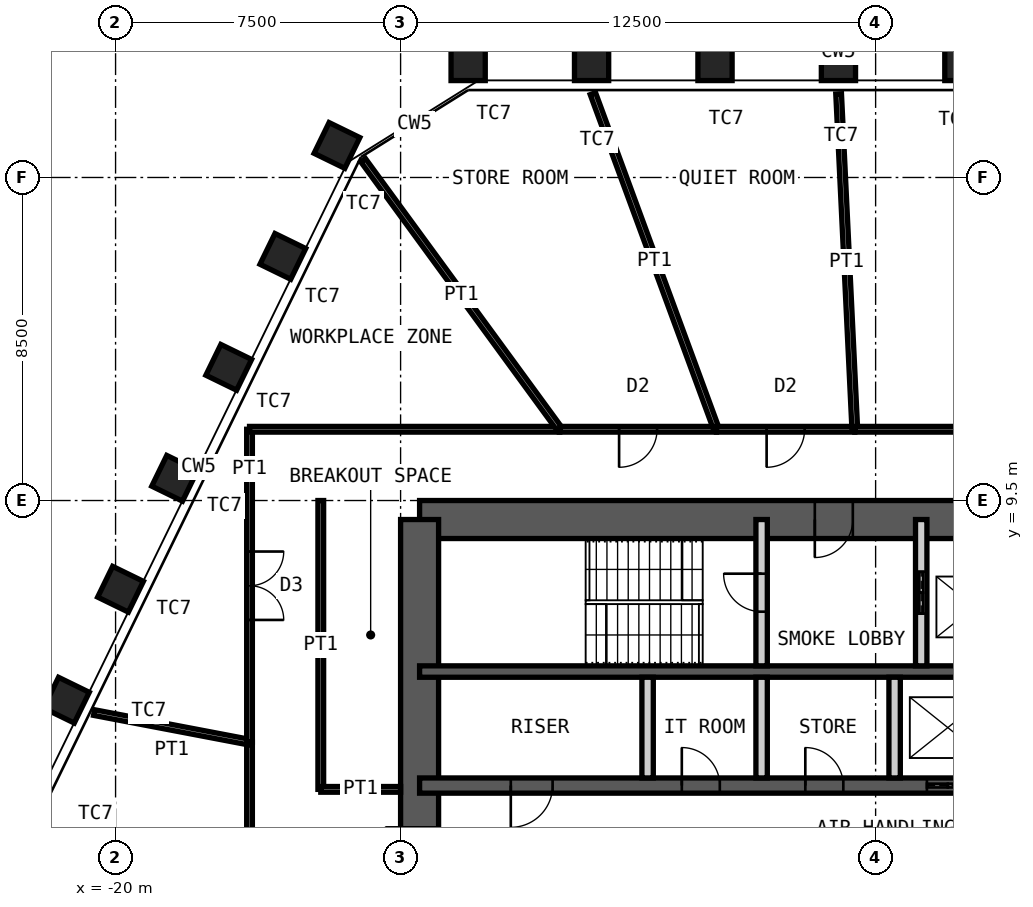
"""IFC4 building model, lengths in metres.
Left out: names, types, materials, properties, quantities, classifications, styles, units other than length and angle.
Written with IfcOpenShell. Run it as: python <this file> out.ifc"""

import sys

from ifc_helpers import new_model, si_unit, direction, frame, frame_2d, origin, origin_2d, place, context, subcontext, project, spatial, rectangle, hollow_rectangle, extrude, element, fill, save


model = new_model("IFC4")
c1 = context("Model", 3, precision=1e-05, world=origin(), true_north=direction((0.0, 1.0)))
c2 = subcontext(c1, "Body", "Model", "MODEL_VIEW")
j1 = project(units=[si_unit("LENGTHUNIT", "METRE"), si_unit("PLANEANGLEUNIT", "RADIAN")], contexts=[c1])
p1 = place(None, origin())
s1 = spatial("IfcSite", under=j1, at=p1, CompositionType="ELEMENT")
p2 = place(p1, origin())
s2 = spatial("IfcBuilding", under=s1, at=p2, CompositionType="ELEMENT")
p3 = place(p2, frame((0.0, 0.0, 266.2)))
s3 = spatial("IfcBuildingStorey", under=s2, at=p3, CompositionType="ELEMENT", Elevation=266.2)
for number, where, z_axis, x_axis in (
    (1, (-10.722, 21.0, 0.0), (0.0, 0.0, 1.0), (-1.0, 0.0, 0.0)),
    (2, (-7.474, 21.0, 0.0), (0.0, 0.0, 1.0), (-1.0, 0.0, 0.0)),
    (3, (-4.226, 21.0, 0.0), (0.0, 0.0, 1.0), (-1.0, 0.0, 0.0)),
    (4, (-0.978, 21.0, 0.0), (0.0, 0.0, 1.0), (-1.0, 0.0, 0.0)),
    (5, (2.27, 21.0, 0.0), (0.0, 0.0, 1.0), (-1.0, 0.0, 0.0)),
    (6, (-21.293, 4.246, 0.0), (0.0, 0.0, 1.0), (-0.438, -0.899, 0.0)),
    (7, (-19.87, 7.166, 0.0), (0.0, 0.0, 1.0), (-0.438, -0.899, 0.0)),
    (8, (-18.446, 10.085, 0.0), (0.0, 0.0, 1.0), (-0.438, -0.899, 0.0)),
    (9, (-17.022, 13.004, 0.0), (0.0, 0.0, 1.0), (-0.438, -0.899, 0.0)),
    (10, (-15.598, 15.924, 0.0), (0.0, 0.0, 1.0), (-0.438, -0.899, 0.0)),
    (11, (-14.174, 18.843, 0.0), (0.0, 0.0, 1.0), (-0.438, -0.899, 0.0)),
):
    element("IfcColumn", number, at=place(p3, frame(where, z_axis=z_axis, x_axis=x_axis)), inside=s3, PredefinedType="COLUMN", context=c2, shape_type="SweptSolid", body=[
        extrude(hollow_rectangle(XDim=0.9, YDim=0.9, WallThickness=0.06, at=origin_2d()), origin(), (0.0, 0.0, 1.0), 4.2),
    ])
p4 = place(p3, frame((-12.0, 9.0, 0.0), z_axis=(0.0, 0.0, 1.0), x_axis=(1.0, 0.0, 0.0)))
e12 = element("IfcWall", 12, at=p4, inside=s3, PredefinedType="SHEAR", context=c2, shape_type="SweptSolid", body=[
    extrude(rectangle(XDim=24.0, YDim=1.0, at=frame_2d((12.0, 0.0))), origin(), (0.0, 0.0, 1.0), 4.2),
])
p5 = place(p4, frame((10.4, 0.0, 0.0)))
e13 = element("IfcOpeningElement", 13, at=p5, cuts=e12, PredefinedType="OPENING", context=c2, shape_type="SweptSolid", body=[
    extrude(rectangle(XDim=1.0, YDim=2.1, at=frame_2d((0.5, 1.05))), frame((0.0, 0.51, 0.0), z_axis=(0.0, -1.0, 0.0), x_axis=(1.0, 0.0, 0.0)), (0.0, 0.0, 1.0), 1.02),
])
p6 = place(p4, frame((17.6, 0.0, 0.0)))
e14 = element("IfcOpeningElement", 14, at=p6, cuts=e12, PredefinedType="OPENING", context=c2, shape_type="SweptSolid", body=[
    extrude(rectangle(XDim=0.9, YDim=2.1, at=frame_2d((0.45, 1.05))), frame((0.0, 0.51, 0.0), z_axis=(0.0, -1.0, 0.0), x_axis=(1.0, 0.0, 0.0)), (0.0, 0.0, 1.0), 1.02),
])
p7 = place(p4, frame((21.9, 0.0, 0.0)))
e15 = element("IfcOpeningElement", 15, at=p7, cuts=e12, PredefinedType="OPENING", context=c2, shape_type="SweptSolid", body=[
    extrude(rectangle(XDim=0.9, YDim=2.1, at=frame_2d((0.45, 1.05))), frame((0.0, 0.51, 0.0), z_axis=(0.0, -1.0, 0.0), x_axis=(1.0, 0.0, 0.0)), (0.0, 0.0, 1.0), 1.02),
])
p8 = place(p3, frame((-12.0, -9.0, 0.0), z_axis=(0.0, 0.0, 1.0), x_axis=(0.0, 1.0, 0.0)))
e16 = element("IfcWall", 16, at=p8, inside=s3, PredefinedType="SHEAR", context=c2, shape_type="SweptSolid", body=[
    extrude(rectangle(XDim=18.0, YDim=1.0, at=frame_2d((9.0, 0.0))), origin(), (0.0, 0.0, 1.0), 4.2),
])
p9 = place(p8, frame((8.1, 0.0, 0.0)))
e17 = element("IfcOpeningElement", 17, at=p9, cuts=e16, PredefinedType="OPENING", context=c2, shape_type="SweptSolid", body=[
    extrude(rectangle(XDim=1.8, YDim=2.1, at=frame_2d((0.9, 1.05))), frame((0.0, 0.51, 0.0), z_axis=(0.0, -1.0, 0.0), x_axis=(1.0, 0.0, 0.0)), (0.0, 0.0, 1.0), 1.02),
])
p10 = place(p3, frame((-12.0, 5.0, 0.0), z_axis=(0.0, 0.0, 1.0), x_axis=(1.0, 0.0, 0.0)))
e18 = element("IfcWall", 18, at=p10, inside=s3, PredefinedType="SHEAR", context=c2, shape_type="SweptSolid", body=[
    extrude(rectangle(XDim=24.0, YDim=0.3, at=frame_2d((12.0, 0.0))), origin(), (0.0, 0.0, 1.0), 4.2),
])
p11 = place(p3, frame((-12.0, 2.0, 0.0), z_axis=(0.0, 0.0, 1.0), x_axis=(1.0, 0.0, 0.0)))
e19 = element("IfcWall", 19, at=p11, inside=s3, PredefinedType="SHEAR", context=c2, shape_type="SweptSolid", body=[
    extrude(rectangle(XDim=24.0, YDim=0.4, at=frame_2d((12.0, 0.0))), origin(), (0.0, 0.0, 1.0), 4.2),
])
p12 = place(p11, frame((2.4, 0.0, 0.0)))
e20 = element("IfcOpeningElement", 20, at=p12, cuts=e19, PredefinedType="OPENING", context=c2, shape_type="SweptSolid", body=[
    extrude(rectangle(XDim=1.1, YDim=2.1, at=frame_2d((0.55, 1.05))), frame((0.0, 0.21, 0.0), z_axis=(0.0, -1.0, 0.0), x_axis=(1.0, 0.0, 0.0)), (0.0, 0.0, 1.0), 0.42),
])
p13 = place(p11, frame((22.0, 0.0, 0.0)))
e21 = element("IfcOpeningElement", 21, at=p13, cuts=e19, PredefinedType="OPENING", context=c2, shape_type="SweptSolid", body=[
    extrude(rectangle(XDim=1.1, YDim=2.1, at=frame_2d((0.55, 1.05))), frame((0.0, 0.21, 0.0), z_axis=(0.0, -1.0, 0.0), x_axis=(1.0, 0.0, 0.0)), (0.0, 0.0, 1.0), 0.42),
])
p14 = place(p11, frame((10.15, 0.0, 0.0)))
e22 = element("IfcOpeningElement", 22, at=p14, cuts=e19, PredefinedType="OPENING", context=c2, shape_type="SweptSolid", body=[
    extrude(rectangle(XDim=1.0, YDim=2.1, at=frame_2d((0.5, 1.05))), frame((0.0, 0.21, 0.0), z_axis=(0.0, -1.0, 0.0), x_axis=(1.0, 0.0, 0.0)), (0.0, 0.0, 1.0), 0.42),
])
p15 = place(p11, frame((6.9, 0.0, 0.0)))
e23 = element("IfcOpeningElement", 23, at=p15, cuts=e19, PredefinedType="OPENING", context=c2, shape_type="SweptSolid", body=[
    extrude(rectangle(XDim=1.0, YDim=2.1, at=frame_2d((0.5, 1.05))), frame((0.0, 0.21, 0.0), z_axis=(0.0, -1.0, 0.0), x_axis=(1.0, 0.0, 0.0)), (0.0, 0.0, 1.0), 0.42),
])
p16 = place(p11, frame((13.35, 0.0, 0.0)))
e24 = element("IfcOpeningElement", 24, at=p16, cuts=e19, PredefinedType="OPENING", context=c2, shape_type="SweptSolid", body=[
    extrude(rectangle(XDim=1.1, YDim=2.4, at=frame_2d((0.55, 1.2))), frame((0.0, 0.21, 0.0), z_axis=(0.0, -1.0, 0.0), x_axis=(1.0, 0.0, 0.0)), (0.0, 0.0, 1.0), 0.42),
])
p17 = place(p11, frame((16.15, 0.0, 0.0)))
e25 = element("IfcOpeningElement", 25, at=p17, cuts=e19, PredefinedType="OPENING", context=c2, shape_type="SweptSolid", body=[
    extrude(rectangle(XDim=1.1, YDim=2.4, at=frame_2d((0.55, 1.2))), frame((0.0, 0.21, 0.0), z_axis=(0.0, -1.0, 0.0), x_axis=(1.0, 0.0, 0.0)), (0.0, 0.0, 1.0), 0.42),
])
p18 = place(p11, frame((19.0, 0.0, 0.0)))
e26 = element("IfcOpeningElement", 26, at=p18, cuts=e19, PredefinedType="OPENING", context=c2, shape_type="SweptSolid", body=[
    extrude(rectangle(XDim=1.0, YDim=2.1, at=frame_2d((0.5, 1.05))), frame((0.0, 0.21, 0.0), z_axis=(0.0, -1.0, 0.0), x_axis=(1.0, 0.0, 0.0)), (0.0, 0.0, 1.0), 0.42),
])
p19 = place(p3, frame((-3.0, 5.15, 0.0), z_axis=(0.0, 0.0, 1.0), x_axis=(0.0, 1.0, 0.0)))
e27 = element("IfcWall", 27, at=p19, inside=s3, PredefinedType="PARTITIONING", context=c2, shape_type="SweptSolid", body=[
    extrude(rectangle(XDim=3.85, YDim=0.3, at=frame_2d((1.925, 0.0))), origin(), (0.0, 0.0, 1.0), 3.98),
])
p20 = place(p19, frame((1.425, 0.0, 0.0)))
e28 = element("IfcOpeningElement", 28, at=p20, cuts=e27, PredefinedType="OPENING", context=c2, shape_type="SweptSolid", body=[
    extrude(rectangle(XDim=1.0, YDim=2.1, at=frame_2d((0.5, 1.05))), frame((0.0, 0.16, 0.0), z_axis=(0.0, -1.0, 0.0), x_axis=(1.0, 0.0, 0.0)), (0.0, 0.0, 1.0), 0.32),
])
p21 = place(p3, frame((1.2, 5.15, 0.0), z_axis=(0.0, 0.0, 1.0), x_axis=(0.0, 1.0, 0.0)))
e29 = element("IfcWall", 29, at=p21, inside=s3, PredefinedType="PARTITIONING", context=c2, shape_type="SweptSolid", body=[
    extrude(rectangle(XDim=3.85, YDim=0.3, at=frame_2d((1.925, 0.0))), origin(), (0.0, 0.0, 1.0), 3.98),
])
p22 = place(p21, frame((1.375, 0.0, 0.0)))
e30 = element("IfcOpeningElement", 30, at=p22, cuts=e29, PredefinedType="OPENING", context=c2, shape_type="SweptSolid", body=[
    extrude(rectangle(XDim=1.1, YDim=2.4, at=frame_2d((0.55, 1.2))), frame((0.0, 0.16, 0.0), z_axis=(0.0, -1.0, 0.0), x_axis=(1.0, 0.0, 0.0)), (0.0, 0.0, 1.0), 0.32),
])
for number, where, z_axis, x_axis in (
    (31, (-6.0, 2.2, 0.0), (0.0, 0.0, 1.0), (0.0, 1.0, 0.0)),
    (32, (-3.0, 2.2, 0.0), (0.0, 0.0, 1.0), (0.0, 1.0, 0.0)),
    (33, (0.5, 2.2, 0.0), (0.0, 0.0, 1.0), (0.0, 1.0, 0.0)),
):
    element("IfcWall", number, at=place(p3, frame(where, z_axis=z_axis, x_axis=x_axis)), inside=s3, PredefinedType="PARTITIONING", context=c2, shape_type="SweptSolid", body=[
        extrude(rectangle(XDim=2.65, YDim=0.3, at=frame_2d((1.325, 0.0))), origin(), (0.0, 0.0, 1.0), 3.98),
    ])
p23 = place(p3, frame((-16.475, -4.351, 0.0), z_axis=(0.0, 0.0, 1.0), x_axis=(0.0, 1.0, 0.0)))
e34 = element("IfcWall", 34, at=p23, inside=s3, PredefinedType="PARTITIONING", context=c2, shape_type="SweptSolid", body=[
    extrude(rectangle(XDim=7.492, YDim=0.15, at=frame_2d((3.746, 0.0))), origin(), (0.0, 0.0, 1.0), 4.03),
])
p24 = place(p23, frame((3.246, 0.0, 0.0)))
e35 = element("IfcOpeningElement", 35, at=p24, cuts=e34, PredefinedType="OPENING", context=c2, shape_type="SweptSolid", body=[
    extrude(rectangle(XDim=1.0, YDim=2.4, at=frame_2d((0.5, 1.2))), frame((0.0, 0.085, 0.0), z_axis=(0.0, -1.0, 0.0), x_axis=(1.0, 0.0, 0.0)), (0.0, 0.0, 1.0), 0.17),
])
p25 = place(p3, frame((-20.566, 3.921, 0.0), z_axis=(0.0, 0.0, 1.0), x_axis=(0.982304172816, -0.187292584123, 0.0)))
e36 = element("IfcWall", 36, at=p25, inside=s3, PredefinedType="PARTITIONING", context=c2, shape_type="SweptSolid", body=[
    extrude(rectangle(XDim=4.165, YDim=0.15, at=frame_2d((2.083, 0.0))), origin(), (0.0, 0.0, 1.0), 3.33),
])
p26 = place(p3, frame((-16.475, 3.141, 0.0), z_axis=(0.0, 0.0, 1.0), x_axis=(0.0, 1.0, 0.0)))
e37 = element("IfcWall", 37, at=p26, inside=s3, PredefinedType="PARTITIONING", context=c2, shape_type="SweptSolid", body=[
    extrude(rectangle(XDim=8.234, YDim=0.15, at=frame_2d((4.117, 0.0))), origin(), (0.0, 0.0, 1.0), 4.03),
])
p27 = place(p26, frame((3.217, 0.0, 0.0)))
e38 = element("IfcOpeningElement", 38, at=p27, cuts=e37, PredefinedType="OPENING", context=c2, shape_type="SweptSolid", body=[
    extrude(rectangle(XDim=1.8, YDim=2.4, at=frame_2d((0.9, 1.2))), frame((0.0, 0.085, 0.0), z_axis=(0.0, -1.0, 0.0), x_axis=(1.0, 0.0, 0.0)), (0.0, 0.0, 1.0), 0.17),
])
p28 = place(p3, frame((-16.475, 11.375, 0.0), z_axis=(0.0, 0.0, 1.0), x_axis=(1.0, 0.0, 0.0)))
e39 = element("IfcWall", 39, at=p28, inside=s3, PredefinedType="PARTITIONING", context=c2, shape_type="SweptSolid", body=[
    extrude(rectangle(XDim=8.163, YDim=0.15, at=frame_2d((4.082, 0.0))), origin(), (0.0, 0.0, 1.0), 4.03),
])
p29 = place(p3, frame((-13.486, 18.455, 0.0), z_axis=(0.0, 0.0, 1.0), x_axis=(0.589997742419, -0.807404894672, 0.0)))
e40 = element("IfcWall", 40, at=p29, inside=s3, PredefinedType="PARTITIONING", context=c2, shape_type="SweptSolid", body=[
    extrude(rectangle(XDim=8.769, YDim=0.15, at=frame_2d((4.385, 0.0))), origin(), (0.0, 0.0, 1.0), 2.93),
])
p30 = place(p3, frame((-8.312, 11.375, 0.0), z_axis=(0.0, 0.0, 1.0), x_axis=(1.0, 0.0, 0.0)))
e41 = element("IfcWall", 41, at=p30, inside=s3, PredefinedType="PARTITIONING", context=c2, shape_type="SweptSolid", body=[
    extrude(rectangle(XDim=4.124, YDim=0.15, at=frame_2d((2.062, 0.0))), origin(), (0.0, 0.0, 1.0), 4.03),
])
p31 = place(p30, frame((1.562, 0.0, 0.0)))
e42 = element("IfcOpeningElement", 42, at=p31, cuts=e41, PredefinedType="OPENING", context=c2, shape_type="SweptSolid", body=[
    extrude(rectangle(XDim=1.0, YDim=2.4, at=frame_2d((0.5, 1.2))), frame((0.0, 0.085, 0.0), z_axis=(0.0, -1.0, 0.0), x_axis=(1.0, 0.0, 0.0)), (0.0, 0.0, 1.0), 0.17),
])
p32 = place(p3, frame((-7.44, 20.206, 0.0), z_axis=(0.0, 0.0, 1.0), x_axis=(0.345510588088, -0.938414851502, 0.0)))
e43 = element("IfcWall", 43, at=p32, inside=s3, PredefinedType="PARTITIONING", context=c2, shape_type="SweptSolid", body=[
    extrude(rectangle(XDim=9.411, YDim=0.15, at=frame_2d((4.705, 0.0))), origin(), (0.0, 0.0, 1.0), 3.33),
])
p33 = place(p3, frame((-4.188, 11.375, 0.0), z_axis=(0.0, 0.0, 1.0), x_axis=(1.0, 0.0, 0.0)))
e44 = element("IfcWall", 44, at=p33, inside=s3, PredefinedType="PARTITIONING", context=c2, shape_type="SweptSolid", body=[
    extrude(rectangle(XDim=3.64, YDim=0.15, at=frame_2d((1.82, 0.0))), origin(), (0.0, 0.0, 1.0), 4.03),
])
p34 = place(p33, frame((1.32, 0.0, 0.0)))
e45 = element("IfcOpeningElement", 45, at=p34, cuts=e44, PredefinedType="OPENING", context=c2, shape_type="SweptSolid", body=[
    extrude(rectangle(XDim=1.0, YDim=2.4, at=frame_2d((0.5, 1.2))), frame((0.0, 0.085, 0.0), z_axis=(0.0, -1.0, 0.0), x_axis=(1.0, 0.0, 0.0)), (0.0, 0.0, 1.0), 0.17),
])
p35 = place(p3, frame((-0.973, 20.2, 0.0), z_axis=(0.0, 0.0, 1.0), x_axis=(0.048134910622, -0.998840843368, 0.0)))
e46 = element("IfcWall", 46, at=p35, inside=s3, PredefinedType="PARTITIONING", context=c2, shape_type="SweptSolid", body=[
    extrude(rectangle(XDim=8.835, YDim=0.15, at=frame_2d((4.418, 0.0))), origin(), (0.0, 0.0, 1.0), 3.33),
])
p36 = place(p3, frame((-0.548, 11.375, 0.0), z_axis=(0.0, 0.0, 1.0), x_axis=(1.0, 0.0, 0.0)))
e47 = element("IfcWall", 47, at=p36, inside=s3, PredefinedType="PARTITIONING", context=c2, shape_type="SweptSolid", body=[
    extrude(rectangle(XDim=10.365, YDim=0.15, at=frame_2d((5.182, 0.0))), origin(), (0.0, 0.0, 1.0), 4.03),
])
p37 = place(p36, frame((4.282, 0.0, 0.0)))
e48 = element("IfcOpeningElement", 48, at=p37, cuts=e47, PredefinedType="OPENING", context=c2, shape_type="SweptSolid", body=[
    extrude(rectangle(XDim=1.8, YDim=2.4, at=frame_2d((0.9, 1.2))), frame((0.0, 0.085, 0.0), z_axis=(0.0, -1.0, 0.0), x_axis=(1.0, 0.0, 0.0)), (0.0, 0.0, 1.0), 0.17),
])
p38 = place(p3, frame((-14.6, 1.9, 0.0), z_axis=(0.0, 0.0, 1.0), x_axis=(0.0, 1.0, 0.0)))
e49 = element("IfcWall", 49, at=p38, inside=s3, PredefinedType="PARTITIONING", context=c2, shape_type="SweptSolid", body=[
    extrude(rectangle(XDim=7.6, YDim=0.15, at=frame_2d((3.8, 0.0))), origin(), (0.0, 0.0, 1.0), 4.03),
])
p39 = place(p3, frame((-12.5, 1.9, 0.0), z_axis=(0.0, 0.0, 1.0), x_axis=(-1.0, 0.0, 0.0)))
e50 = element("IfcWall", 50, at=p39, inside=s3, PredefinedType="PARTITIONING", context=c2, shape_type="SweptSolid", body=[
    extrude(rectangle(XDim=2.1, YDim=0.15, at=frame_2d((1.05, 0.0))), origin(), (0.0, 0.0, 1.0), 3.53),
])
p40 = place(p5, origin())
e51 = element("IfcDoor", 51, at=p40, inside=s3, OperationType="SINGLE_SWING_LEFT", PredefinedType="DOOR", context=c2, shape_type="SweptSolid", body=[
    extrude(rectangle(XDim=1.0, YDim=2.1, at=frame_2d((0.5, 1.05))), frame((0.0, 0.025, 0.0), z_axis=(0.0, -1.0, 0.0), x_axis=(1.0, 0.0, 0.0)), (0.0, 0.0, 1.0), 0.05),
])
fill(e13, e51)
p41 = place(p20, origin())
e52 = element("IfcDoor", 52, at=p41, inside=s3, OperationType="SINGLE_SWING_LEFT", PredefinedType="DOOR", context=c2, shape_type="SweptSolid", body=[
    extrude(rectangle(XDim=1.0, YDim=2.1, at=frame_2d((0.5, 1.05))), frame((0.0, 0.025, 0.0), z_axis=(0.0, -1.0, 0.0), x_axis=(1.0, 0.0, 0.0)), (0.0, 0.0, 1.0), 0.05),
])
fill(e28, e52)
p42 = place(p12, origin())
e53 = element("IfcDoor", 53, at=p42, inside=s3, OperationType="SINGLE_SWING_LEFT", PredefinedType="DOOR", context=c2, shape_type="SweptSolid", body=[
    extrude(rectangle(XDim=1.1, YDim=2.1, at=frame_2d((0.55, 1.05))), frame((0.0, 0.025, 0.0), z_axis=(0.0, -1.0, 0.0), x_axis=(1.0, 0.0, 0.0)), (0.0, 0.0, 1.0), 0.05),
])
fill(e20, e53)
p43 = place(p14, origin())
e54 = element("IfcDoor", 54, at=p43, inside=s3, OperationType="SINGLE_SWING_RIGHT", PredefinedType="DOOR", context=c2, shape_type="SweptSolid", body=[
    extrude(rectangle(XDim=1.0, YDim=2.1, at=frame_2d((0.5, 1.05))), frame((0.0, 0.025, 0.0), z_axis=(0.0, -1.0, 0.0), x_axis=(1.0, 0.0, 0.0)), (0.0, 0.0, 1.0), 0.05),
])
fill(e22, e54)
p44 = place(p9, origin())
e55 = element("IfcDoor", 55, at=p44, inside=s3, OperationType="DOUBLE_DOOR_DOUBLE_SWING", PredefinedType="DOOR", context=c2, shape_type="SweptSolid", body=[
    extrude(rectangle(XDim=1.8, YDim=2.1, at=frame_2d((0.9, 1.05))), frame((0.0, 0.025, 0.0), z_axis=(0.0, -1.0, 0.0), x_axis=(1.0, 0.0, 0.0)), (0.0, 0.0, 1.0), 0.05),
])
fill(e17, e55)
p45 = place(p22, origin())
e56 = element("IfcDoor", 56, at=p45, inside=s3, OperationType="DOUBLE_DOOR_SLIDING", PredefinedType="DOOR", context=c2, shape_type="SweptSolid", body=[
    extrude(rectangle(XDim=1.1, YDim=2.4, at=frame_2d((0.55, 1.2))), frame((0.0, 0.025, 0.0), z_axis=(0.0, -1.0, 0.0), x_axis=(1.0, 0.0, 0.0)), (0.0, 0.0, 1.0), 0.05),
])
fill(e30, e56)
p46 = place(p15, origin())
e57 = element("IfcDoor", 57, at=p46, inside=s3, OperationType="SINGLE_SWING_RIGHT", PredefinedType="DOOR", context=c2, shape_type="SweptSolid", body=[
    extrude(rectangle(XDim=1.0, YDim=2.1, at=frame_2d((0.5, 1.05))), frame((0.0, 0.025, 0.0), z_axis=(0.0, -1.0, 0.0), x_axis=(1.0, 0.0, 0.0)), (0.0, 0.0, 1.0), 0.05),
])
fill(e23, e57)
p47 = place(p16, origin())
e58 = element("IfcDoor", 58, at=p47, inside=s3, OperationType="DOUBLE_DOOR_SLIDING", PredefinedType="DOOR", context=c2, shape_type="SweptSolid", body=[
    extrude(rectangle(XDim=1.1, YDim=2.4, at=frame_2d((0.55, 1.2))), frame((0.0, 0.025, 0.0), z_axis=(0.0, -1.0, 0.0), x_axis=(1.0, 0.0, 0.0)), (0.0, 0.0, 1.0), 0.05),
])
fill(e24, e58)
p48 = place(p27, origin())
e59 = element("IfcDoor", 59, at=p48, inside=s3, OperationType="DOUBLE_DOOR_DOUBLE_SWING", PredefinedType="DOOR", context=c2, shape_type="SweptSolid", body=[
    extrude(rectangle(XDim=1.8, YDim=2.4, at=frame_2d((0.9, 1.2))), frame((0.0, 0.025, 0.0), z_axis=(0.0, -1.0, 0.0), x_axis=(1.0, 0.0, 0.0)), (0.0, 0.0, 1.0), 0.05),
])
fill(e38, e59)
p49 = place(p31, origin())
e60 = element("IfcDoor", 60, at=p49, inside=s3, OperationType="SINGLE_SWING_LEFT", PredefinedType="DOOR", context=c2, shape_type="SweptSolid", body=[
    extrude(rectangle(XDim=1.0, YDim=2.4, at=frame_2d((0.5, 1.2))), frame((0.0, 0.025, 0.0), z_axis=(0.0, -1.0, 0.0), x_axis=(1.0, 0.0, 0.0)), (0.0, 0.0, 1.0), 0.05),
])
fill(e42, e60)
p50 = place(p34, origin())
e61 = element("IfcDoor", 61, at=p50, inside=s3, OperationType="SINGLE_SWING_LEFT", PredefinedType="DOOR", context=c2, shape_type="SweptSolid", body=[
    extrude(rectangle(XDim=1.0, YDim=2.4, at=frame_2d((0.5, 1.2))), frame((0.0, 0.025, 0.0), z_axis=(0.0, -1.0, 0.0), x_axis=(1.0, 0.0, 0.0)), (0.0, 0.0, 1.0), 0.05),
])
fill(e45, e61)
save(model, sys.argv[1])
